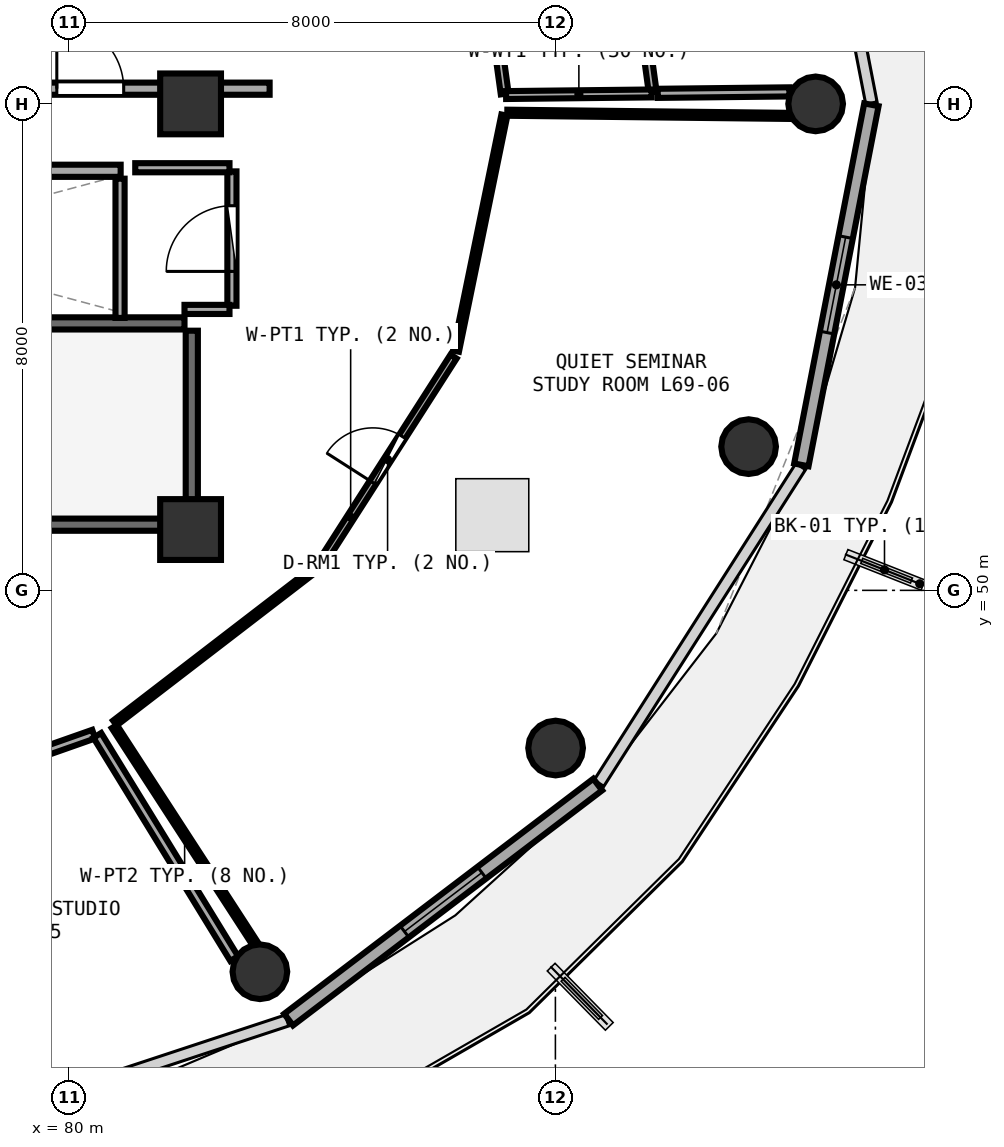
"""IFC4 building model, lengths in metres.
Left out: names, types, materials, properties, quantities, classifications, styles, units other than length and angle.
Written with IfcOpenShell. Run it as: python <this file> out.ifc"""

import sys

from ifc_helpers import new_model, si_unit, direction, frame, frame_2d, origin, origin_2d, place, context, subcontext, project, spatial, rectangle, circle, extrude, element, fill, save


model = new_model("IFC4")
c1 = context("Model", 3, precision=1e-05, world=origin(), true_north=direction((0.0, 1.0)))
c2 = subcontext(c1, "Body", "Model", "MODEL_VIEW")
j1 = project(units=[si_unit("LENGTHUNIT", "METRE"), si_unit("PLANEANGLEUNIT", "RADIAN")], contexts=[c1])
p1 = place(None, origin())
s1 = spatial("IfcSite", under=j1, at=p1, CompositionType="ELEMENT")
p2 = place(p1, origin())
s2 = spatial("IfcBuilding", under=s1, at=p2, CompositionType="ELEMENT")
p3 = place(p2, frame((0.0, 0.0, 271.2)))
s3 = spatial("IfcBuildingStorey", under=s2, at=p3, CompositionType="ELEMENT", Elevation=271.2)
for number, where, z_axis, x_axis in (
    (1, (82.0, 51.0, 0.0), (0.0, 0.0, 1.0), (1.0, 0.0, 0.0)),
    (2, (82.0, 58.0, 0.0), (0.0, 0.0, 1.0), (1.0, 0.0, 0.0)),
):
    element("IfcColumn", number, at=place(p3, frame(where, z_axis=z_axis, x_axis=x_axis)), inside=s3, PredefinedType="PILASTER", context=c2, shape_type="SweptSolid", body=[
        extrude(rectangle(XDim=1.0, YDim=1.0, at=origin_2d()), origin(), (0.0, 0.0, 1.0), 3.75),
    ])
for number, where, z_axis, x_axis in (
    (3, (92.28, 58.0, 0.0), (0.0, 0.0, 1.0), (1.0, 0.0, 0.0)),
    (4, (83.14, 43.728, 0.0), (0.0, 0.0, 1.0), (1.0, 0.0, 0.0)),
    (5, (88.003, 47.407, 0.0), (0.0, 0.0, 1.0), (1.0, 0.0, 0.0)),
    (6, (91.177, 52.364, 0.0), (0.0, 0.0, 1.0), (1.0, 0.0, 0.0)),
):
    element("IfcColumn", number, at=place(p3, frame(where, z_axis=z_axis, x_axis=x_axis)), inside=s3, PredefinedType="COLUMN", context=c2, shape_type="SweptSolid", body=[
        extrude(circle(Radius=0.45, at=origin_2d()), origin(), (0.0, 0.0, 1.0), 3.75),
    ])
p4 = place(p3, frame((83.612, 42.94, 0.0), z_axis=(0.0, 0.0, 1.0), x_axis=(0.796010444211, 0.605282886514, 0.0)))
e7 = element("IfcWall", 7, at=p4, inside=s3, PredefinedType="SOLIDWALL", context=c2, shape_type="SweptSolid", body=[
    extrude(rectangle(XDim=6.387, YDim=0.24, at=frame_2d((3.194, 0.0))), origin(), (0.0, 0.0, 1.0), 3.475),
])
p5 = place(p4, frame((2.394, 0.0, 0.85)))
e8 = element("IfcOpeningElement", 8, at=p5, cuts=e7, PredefinedType="OPENING", context=c2, shape_type="SweptSolid", body=[
    extrude(rectangle(XDim=1.6, YDim=1.45, at=frame_2d((0.8, 0.725))), frame((0.0, 0.13, 0.0), z_axis=(0.0, -1.0, 0.0), x_axis=(1.0, 0.0, 0.0)), (0.0, 0.0, 1.0), 0.26),
])
p6 = place(p3, frame((92.045, 52.063, 0.0), z_axis=(0.0, 0.0, 1.0), x_axis=(0.190969309115, 0.981596008028, 0.0)))
e9 = element("IfcWall", 9, at=p6, inside=s3, PredefinedType="SOLIDWALL", context=c2, shape_type="SweptSolid", body=[
    extrude(rectangle(XDim=6.033, YDim=0.24, at=frame_2d((3.017, 0.0))), origin(), (0.0, 0.0, 1.0), 3.475),
])
p7 = place(p6, frame((2.216, 0.0, 0.85)))
e10 = element("IfcOpeningElement", 10, at=p7, cuts=e9, PredefinedType="OPENING", context=c2, shape_type="SweptSolid", body=[
    extrude(rectangle(XDim=1.6, YDim=1.45, at=frame_2d((0.8, 0.725))), frame((0.0, 0.13, 0.0), z_axis=(0.0, -1.0, 0.0), x_axis=(1.0, 0.0, 0.0)), (0.0, 0.0, 1.0), 0.26),
])
p8 = place(p3, frame((74.0, 51.08, 0.0), z_axis=(0.0, 0.0, 1.0), x_axis=(1.0, 0.0, 0.0)))
e11 = element("IfcWall", 11, at=p8, inside=s3, PredefinedType="SHEAR", context=c2, shape_type="SweptSolid", body=[
    extrude(rectangle(XDim=7.9, YDim=0.2, at=frame_2d((3.95, 0.0))), origin(), (0.0, 0.0, 1.0), 3.49),
])
p9 = place(p8, frame((1.12, 0.0, 0.0)))
e12 = element("IfcOpeningElement", 12, at=p9, cuts=e11, PredefinedType="OPENING", context=c2, shape_type="SweptSolid", body=[
    extrude(rectangle(XDim=1.05, YDim=2.1, at=frame_2d((0.525, 1.05))), frame((0.0, 0.11, 0.0), z_axis=(0.0, -1.0, 0.0), x_axis=(1.0, 0.0, 0.0)), (0.0, 0.0, 1.0), 0.22),
])
p10 = place(p3, frame((82.02, 51.2, 0.0), z_axis=(0.0, 0.0, 1.0), x_axis=(0.0, 1.0, 0.0)))
e13 = element("IfcWall", 13, at=p10, inside=s3, PredefinedType="SHEAR", context=c2, shape_type="SweptSolid", body=[
    extrude(rectangle(XDim=3.07, YDim=0.2, at=frame_2d((1.535, 0.0))), origin(), (0.0, 0.0, 1.0), 3.49),
])
p11 = place(p3, frame((81.9, 54.39, 0.0), z_axis=(0.0, 0.0, 1.0), x_axis=(-1.0, 0.0, 0.0)))
e14 = element("IfcWall", 14, at=p11, inside=s3, PredefinedType="SHEAR", context=c2, shape_type="SweptSolid", body=[
    extrude(rectangle(XDim=8.46, YDim=0.2, at=frame_2d((4.23, 0.0))), origin(), (0.0, 0.0, 1.0), 3.49),
])
p12 = place(p3, frame((79.3, 58.25, 0.0), z_axis=(0.0, 0.0, 1.0), x_axis=(1.0, 0.0, 0.0)))
e15 = element("IfcWall", 15, at=p12, inside=s3, PredefinedType="SOLIDWALL", context=c2, shape_type="SweptSolid", body=[
    extrude(rectangle(XDim=4.0, YDim=0.2, at=frame_2d((2.0, 0.0))), origin(), (0.0, 0.0, 1.0), 2.775),
])
p13 = place(p12, frame((0.5, 0.0, 0.0)))
e16 = element("IfcOpeningElement", 16, at=p13, cuts=e15, PredefinedType="OPENING", context=c2, shape_type="SweptSolid", body=[
    extrude(rectangle(XDim=1.1, YDim=2.1, at=frame_2d((0.55, 1.05))), frame((0.0, 0.11, 0.0), z_axis=(0.0, -1.0, 0.0), x_axis=(1.0, 0.0, 0.0)), (0.0, 0.0, 1.0), 0.22),
])
p14 = place(p3, frame((72.45, 56.9, 0.0), z_axis=(0.0, 0.0, 1.0), x_axis=(1.0, 0.0, 0.0)))
e17 = element("IfcWall", 17, at=p14, inside=s3, PredefinedType="SOLIDWALL", context=c2, shape_type="SweptSolid", body=[
    extrude(rectangle(XDim=8.4, YDim=0.2, at=frame_2d((4.2, 0.0))), origin(), (0.0, 0.0, 1.0), 3.48),
])
p15 = place(p14, frame((0.4, 0.0, 0.0)))
e18 = element("IfcOpeningElement", 18, at=p15, cuts=e17, PredefinedType="OPENING", context=c2, shape_type="SweptSolid", body=[
    extrude(rectangle(XDim=1.1, YDim=2.1, at=frame_2d((0.55, 1.05))), frame((0.0, 0.11, 0.0), z_axis=(0.0, -1.0, 0.0), x_axis=(1.0, 0.0, 0.0)), (0.0, 0.0, 1.0), 0.22),
])
p16 = place(p14, frame((2.4, 0.0, 0.0)))
e19 = element("IfcOpeningElement", 19, at=p16, cuts=e17, PredefinedType="OPENING", context=c2, shape_type="SweptSolid", body=[
    extrude(rectangle(XDim=1.1, YDim=2.1, at=frame_2d((0.55, 1.05))), frame((0.0, 0.11, 0.0), z_axis=(0.0, -1.0, 0.0), x_axis=(1.0, 0.0, 0.0)), (0.0, 0.0, 1.0), 0.22),
])
p17 = place(p3, frame((80.84, 54.48, 0.0), z_axis=(0.0, 0.0, 1.0), x_axis=(0.0, 1.0, 0.0)))
e20 = element("IfcWall", 20, at=p17, inside=s3, PredefinedType="PARTITIONING", context=c2, shape_type="SweptSolid", body=[
    extrude(rectangle(XDim=2.29, YDim=0.15, at=frame_2d((1.145, 0.0))), origin(), (0.0, 0.0, 1.0), 3.48),
])
p18 = place(p3, frame((82.68, 54.68, 0.0), z_axis=(0.0, 0.0, 1.0), x_axis=(0.0, 1.0, 0.0)))
e21 = element("IfcWall", 21, at=p18, inside=s3, PredefinedType="PARTITIONING", context=c2, shape_type="SweptSolid", body=[
    extrude(rectangle(XDim=2.21, YDim=0.15, at=frame_2d((1.105, 0.0))), origin(), (0.0, 0.0, 1.0), 3.48),
])
p19 = place(p18, frame((0.565, 0.0, 0.0)))
e22 = element("IfcOpeningElement", 22, at=p19, cuts=e21, PredefinedType="OPENING", context=c2, shape_type="SweptSolid", body=[
    extrude(rectangle(XDim=1.08, YDim=2.1, at=frame_2d((0.54, 1.05))), frame((0.0, 0.085, 0.0), z_axis=(0.0, -1.0, 0.0), x_axis=(1.0, 0.0, 0.0)), (0.0, 0.0, 1.0), 0.17),
])
p20 = place(p3, frame((84.156, 50.458, 0.0), z_axis=(0.0, 0.0, 1.0), x_axis=(0.539324099435, 0.842098281538, 0.0)))
e23 = element("IfcWall", 23, at=p20, inside=s3, PredefinedType="PARTITIONING", context=c2, shape_type="SweptSolid", body=[
    extrude(rectangle(XDim=4.022, YDim=0.12, at=frame_2d((2.011, 0.0))), origin(), (0.0, 0.0, 1.0), 3.075),
])
p21 = place(p20, frame((1.561, 0.0, 0.0)))
e24 = element("IfcOpeningElement", 24, at=p21, cuts=e23, PredefinedType="OPENING", context=c2, shape_type="SweptSolid", body=[
    extrude(rectangle(XDim=0.9, YDim=2.08, at=frame_2d((0.45, 1.04))), frame((0.0, 0.07, 0.0), z_axis=(0.0, -1.0, 0.0), x_axis=(1.0, 0.0, 0.0)), (0.0, 0.0, 1.0), 0.14),
])
p22 = place(p3, frame((81.9, 54.62, 0.0), z_axis=(0.0, 0.0, 1.0), x_axis=(1.0, 0.0, 0.0)))
e25 = element("IfcWall", 25, at=p22, inside=s3, PredefinedType="PARTITIONING", context=c2, shape_type="SweptSolid", body=[
    extrude(rectangle(XDim=0.74, YDim=0.15, at=frame_2d((0.37, 0.0))), origin(), (0.0, 0.0, 1.0), 2.775),
])
p23 = place(p3, frame((82.64, 56.95, 0.0), z_axis=(0.0, 0.0, 1.0), x_axis=(-1.0, 0.0, 0.0)))
e26 = element("IfcWall", 26, at=p23, inside=s3, PredefinedType="PARTITIONING", context=c2, shape_type="SweptSolid", body=[
    extrude(rectangle(XDim=1.55, YDim=0.15, at=frame_2d((0.775, 0.0))), origin(), (0.0, 0.0, 1.0), 2.775),
])
p24 = place(p3, frame((77.072, 46.462, 0.0), z_axis=(0.0, 0.0, 1.0), x_axis=(0.943334007166, 0.331844769319, 0.0)))
e27 = element("IfcWall", 27, at=p24, inside=s3, PredefinedType="PARTITIONING", context=c2, shape_type="SweptSolid", body=[
    extrude(rectangle(XDim=3.536, YDim=0.15, at=frame_2d((1.768, 0.0))), origin(), (0.0, 0.0, 1.0), 3.48),
])
p25 = place(p3, frame((80.466, 47.615, 0.0), z_axis=(0.0, 0.0, 1.0), x_axis=(0.522784059663, -0.852465147066, 0.0)))
e28 = element("IfcWall", 28, at=p25, inside=s3, PredefinedType="PARTITIONING", context=c2, shape_type="SweptSolid", body=[
    extrude(rectangle(XDim=4.306, YDim=0.15, at=frame_2d((2.153, 0.0))), origin(), (0.0, 0.0, 1.0), 3.175),
])
p26 = place(p3, frame((80.756, 47.818, 0.0), z_axis=(0.0, 0.0, 1.0), x_axis=(0.792820246885, 0.609455540733, 0.0)))
e29 = element("IfcWall", 29, at=p26, inside=s3, PredefinedType="PARTITIONING", context=c2, shape_type="SweptSolid", body=[
    extrude(rectangle(XDim=4.207, YDim=0.1, at=frame_2d((2.104, 0.0))), origin(), (0.0, 0.0, 1.0), 3.075),
])
p27 = place(p3, frame((86.365, 53.934, 0.0), z_axis=(0.0, 0.0, 1.0), x_axis=(0.200853183429, 0.979621354762, 0.0)))
e30 = element("IfcWall", 30, at=p27, inside=s3, PredefinedType="PARTITIONING", context=c2, shape_type="SweptSolid", body=[
    extrude(rectangle(XDim=3.963, YDim=0.1, at=frame_2d((1.981, 0.0))), origin(), (0.0, 0.0, 1.0), 3.48),
])
p28 = place(p3, frame((87.209, 57.854, 0.0), z_axis=(0.0, 0.0, 1.0), x_axis=(0.999937174585, -0.01120923205, 0.0)))
e31 = element("IfcWall", 31, at=p28, inside=s3, PredefinedType="PARTITIONING", context=c2, shape_type="SweptSolid", body=[
    extrude(rectangle(XDim=4.639, YDim=0.1, at=frame_2d((2.32, 0.0))), origin(), (0.0, 0.0, 1.0), 3.075),
])
p29 = place(p3, frame((83.058, 44.196, 0.0), z_axis=(0.0, 0.0, 1.0), x_axis=(-0.544234825024, 0.838932926539, 0.0)))
e32 = element("IfcWall", 32, at=p29, inside=s3, PredefinedType="PARTITIONING", context=c2, shape_type="SweptSolid", body=[
    extrude(rectangle(XDim=4.249, YDim=0.1, at=frame_2d((2.125, 0.0))), origin(), (0.0, 0.0, 1.0), 3.075),
])
p30 = place(p3, frame((87.166, 58.165, 0.0), z_axis=(0.0, 0.0, 1.0), x_axis=(-0.13640850471, 0.990652673667, 0.0)))
e33 = element("IfcWall", 33, at=p30, inside=s3, PredefinedType="PLUMBINGWALL", context=c2, shape_type="SweptSolid", body=[
    extrude(rectangle(XDim=2.599, YDim=0.13, at=frame_2d((1.299, 0.0))), origin(), (0.0, 0.0, 1.0), 3.075),
])
p31 = place(p3, frame((89.18, 61.256, 0.0), z_axis=(0.0, 0.0, 1.0), x_axis=(0.13600432659, -0.990708243202, 0.0)))
e34 = element("IfcWall", 34, at=p31, inside=s3, PredefinedType="PLUMBINGWALL", context=c2, shape_type="SweptSolid", body=[
    extrude(rectangle(XDim=3.093, YDim=0.13, at=frame_2d((1.546, 0.0))), origin(), (0.0, 0.0, 1.0), 3.48),
])
p32 = place(p3, frame((89.583, 58.172, 0.0), z_axis=(0.0, 0.0, 1.0), x_axis=(-0.999938226959, -0.011114956836, 0.0)))
e35 = element("IfcWall", 35, at=p32, inside=s3, PredefinedType="PLUMBINGWALL", context=c2, shape_type="SweptSolid", body=[
    extrude(rectangle(XDim=2.394, YDim=0.13, at=frame_2d((1.197, 0.0))), origin(), (0.0, 0.0, 1.0), 3.075),
])
p33 = place(p3, frame((91.848, 58.198, 0.0), z_axis=(0.0, 0.0, 1.0), x_axis=(-0.999937677283, -0.011164297964, 0.0)))
e36 = element("IfcWall", 36, at=p33, inside=s3, PredefinedType="PARTITIONING", context=c2, shape_type="SweptSolid", body=[
    extrude(rectangle(XDim=2.165, YDim=0.15, at=frame_2d((1.083, 0.0))), origin(), (0.0, 0.0, 1.0), 3.075),
])
p34 = place(p5, origin())
e37 = element("IfcWindow", 37, at=p34, inside=s3, PartitioningType="SINGLE_PANEL", PredefinedType="WINDOW", context=c2, shape_type="SweptSolid", body=[
    extrude(rectangle(XDim=1.6, YDim=1.45, at=frame_2d((0.8, 0.725))), frame((0.0, 0.03, 0.0), z_axis=(0.0, -1.0, 0.0), x_axis=(1.0, 0.0, 0.0)), (0.0, 0.0, 1.0), 0.06),
])
fill(e8, e37)
p35 = place(p7, origin())
e38 = element("IfcWindow", 38, at=p35, inside=s3, PartitioningType="SINGLE_PANEL", PredefinedType="WINDOW", context=c2, shape_type="SweptSolid", body=[
    extrude(rectangle(XDim=1.6, YDim=1.45, at=frame_2d((0.8, 0.725))), frame((0.0, 0.03, 0.0), z_axis=(0.0, -1.0, 0.0), x_axis=(1.0, 0.0, 0.0)), (0.0, 0.0, 1.0), 0.06),
])
fill(e10, e38)
p36 = place(p13, frame((1.1, 0.0, 0.0), z_axis=(0.0, 0.0, 1.0), x_axis=(-1.0, 0.0, 0.0)))
e39 = element("IfcDoor", 39, at=p36, inside=s3, OperationType="SINGLE_SWING_RIGHT", PredefinedType="DOOR", context=c2, shape_type="SweptSolid", body=[
    extrude(rectangle(XDim=1.1, YDim=2.1, at=frame_2d((0.55, 1.05))), frame((0.0, 0.025, 0.0), z_axis=(0.0, -1.0, 0.0), x_axis=(1.0, 0.0, 0.0)), (0.0, 0.0, 1.0), 0.05),
])
fill(e16, e39)
p37 = place(p19, origin())
e40 = element("IfcDoor", 40, at=p37, inside=s3, OperationType="SINGLE_SWING_LEFT", PredefinedType="DOOR", context=c2, shape_type="SweptSolid", body=[
    extrude(rectangle(XDim=1.08, YDim=2.1, at=frame_2d((0.54, 1.05))), frame((0.0, 0.025, 0.0), z_axis=(0.0, -1.0, 0.0), x_axis=(1.0, 0.0, 0.0)), (0.0, 0.0, 1.0), 0.05),
])
fill(e22, e40)
p38 = place(p21, origin())
e41 = element("IfcDoor", 41, at=p38, inside=s3, OperationType="SINGLE_SWING_LEFT", PredefinedType="DOOR", context=c2, shape_type="SweptSolid", body=[
    extrude(rectangle(XDim=0.9, YDim=2.08, at=frame_2d((0.45, 1.04))), frame((0.0, 0.025, 0.0), z_axis=(0.0, -1.0, 0.0), x_axis=(1.0, 0.0, 0.0)), (0.0, 0.0, 1.0), 0.05),
])
fill(e24, e41)
save(model, sys.argv[1])
